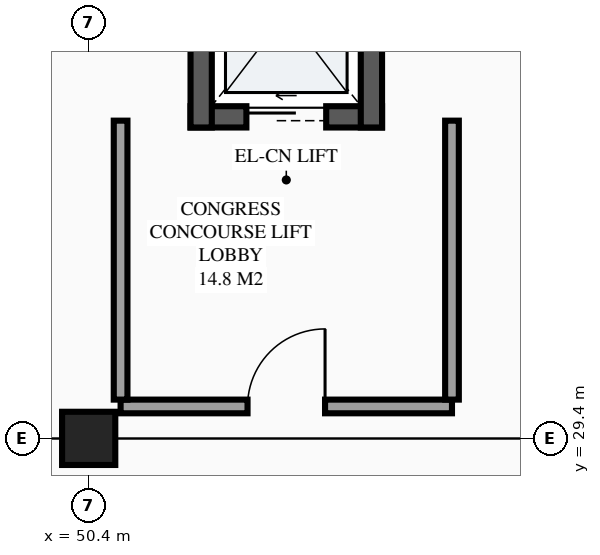
"""IFC4 building model, lengths in metres.
Left out: names, types, materials, properties, quantities, classifications, styles, units other than length and angle.
Written with IfcOpenShell. Run it as: python <this file> out.ifc"""

import sys

from ifc_helpers import new_model, si_unit, direction, frame, frame_2d, origin, origin_2d, place, context, subcontext, project, spatial, rectangle, extrude, element, fill, save


model = new_model("IFC4")
c1 = context("Model", 3, precision=1e-05, world=origin(), true_north=direction((0.0, 1.0)))
c2 = subcontext(c1, "Body", "Model", "MODEL_VIEW")
j1 = project(units=[si_unit("LENGTHUNIT", "METRE"), si_unit("PLANEANGLEUNIT", "RADIAN")], contexts=[c1])
p1 = place(None, origin())
s1 = spatial("IfcSite", under=j1, at=p1, CompositionType="ELEMENT")
p2 = place(p1, origin())
s2 = spatial("IfcBuilding", under=s1, at=p2, CompositionType="ELEMENT")
p3 = place(p2, frame((0.0, 0.0, 14.1)))
s3 = spatial("IfcBuildingStorey", under=s2, at=p3, CompositionType="ELEMENT", Elevation=14.1)
p4 = place(p3, frame((50.4, 29.4, 0.0), z_axis=(0.0, 0.0, 1.0), x_axis=(1.0, 0.0, 0.0)))
e1 = element("IfcColumn", 1, at=p4, inside=s3, PredefinedType="COLUMN", context=c2, shape_type="SweptSolid", body=[
    extrude(rectangle(XDim=0.7, YDim=0.7, at=origin_2d()), origin(), (0.0, 0.0, 1.0), 4.2),
])
p5 = place(p3, frame((51.74, 33.63, 0.0), z_axis=(0.0, 0.0, 1.0), x_axis=(1.0, 0.0, 0.0)))
e2 = element("IfcWall", 2, at=p5, inside=s3, PredefinedType="SHEAR", context=c2, shape_type="SweptSolid", body=[
    extrude(rectangle(XDim=2.52, YDim=0.28, at=frame_2d((1.26, 0.0))), origin(), (0.0, 0.0, 1.0), 4.2),
])
p6 = place(p5, frame((0.735, 0.0, 0.0)))
e3 = element("IfcOpeningElement", 3, at=p6, cuts=e2, PredefinedType="OPENING", context=c2, shape_type="SweptSolid", body=[
    extrude(rectangle(XDim=1.05, YDim=2.2, at=frame_2d((0.525, 1.1))), frame((0.0, 0.15, 0.0), z_axis=(0.0, -1.0, 0.0), x_axis=(1.0, 0.0, 0.0)), (0.0, 0.0, 1.0), 0.3),
])
for number, where, z_axis, x_axis in (
    (4, (54.12, 33.49, 0.0), (0.0, 0.0, 1.0), (0.0, 1.0, 0.0)),
    (5, (51.88, 36.51, 0.0), (0.0, 0.0, 1.0), (0.0, -1.0, 0.0)),
):
    element("IfcWall", number, at=place(p3, frame(where, z_axis=z_axis, x_axis=x_axis)), inside=s3, PredefinedType="SHEAR", context=c2, shape_type="SweptSolid", body=[
        extrude(rectangle(XDim=3.02, YDim=0.28, at=frame_2d((1.51, 0.0))), origin(), (0.0, 0.0, 1.0), 4.2),
    ])
p7 = place(p3, frame((50.82, 29.82, 0.0), z_axis=(0.0, 0.0, 1.0), x_axis=(1.0, 0.0, 0.0)))
e6 = element("IfcWall", 6, at=p7, inside=s3, PredefinedType="PARTITIONING", context=c2, shape_type="SweptSolid", body=[
    extrude(rectangle(XDim=4.36, YDim=0.18, at=frame_2d((2.18, 0.0))), origin(), (0.0, 0.0, 1.0), 3.895),
])
p8 = place(p7, frame((1.67, 0.0, 0.0)))
e7 = element("IfcOpeningElement", 7, at=p8, cuts=e6, PredefinedType="OPENING", context=c2, shape_type="SweptSolid", body=[
    extrude(rectangle(XDim=1.02, YDim=2.15, at=frame_2d((0.51, 1.075))), frame((0.0, 0.1, 0.0), z_axis=(0.0, -1.0, 0.0), x_axis=(1.0, 0.0, 0.0)), (0.0, 0.0, 1.0), 0.2),
])
for number, where, z_axis, x_axis in (
    (8, (50.82, 29.91, 0.0), (0.0, 0.0, 1.0), (0.0, 1.0, 0.0)),
    (9, (55.18, 29.91, 0.0), (0.0, 0.0, 1.0), (0.0, 1.0, 0.0)),
):
    element("IfcWall", number, at=place(p3, frame(where, z_axis=z_axis, x_axis=x_axis)), inside=s3, PredefinedType="PARTITIONING", context=c2, shape_type="SweptSolid", body=[
        extrude(rectangle(XDim=3.67, YDim=0.18, at=frame_2d((1.835, 0.0))), origin(), (0.0, 0.0, 1.0), 3.895),
    ])
p9 = place(p6, origin())
e10 = element("IfcDoor", 10, at=p9, inside=s3, OperationType="SLIDING_TO_LEFT", PredefinedType="DOOR", context=c2, shape_type="SweptSolid", body=[
    extrude(rectangle(XDim=1.05, YDim=2.2, at=frame_2d((0.525, 1.1))), frame((0.0, 0.025, 0.0), z_axis=(0.0, -1.0, 0.0), x_axis=(1.0, 0.0, 0.0)), (0.0, 0.0, 1.0), 0.05),
])
fill(e3, e10)
p10 = place(p8, origin())
e11 = element("IfcDoor", 11, at=p10, inside=s3, OperationType="SINGLE_SWING_RIGHT", PredefinedType="DOOR", context=c2, shape_type="SweptSolid", body=[
    extrude(rectangle(XDim=1.02, YDim=2.15, at=frame_2d((0.51, 1.075))), frame((0.0, 0.025, 0.0), z_axis=(0.0, -1.0, 0.0), x_axis=(1.0, 0.0, 0.0)), (0.0, 0.0, 1.0), 0.05),
])
fill(e7, e11)
save(model, sys.argv[1])
